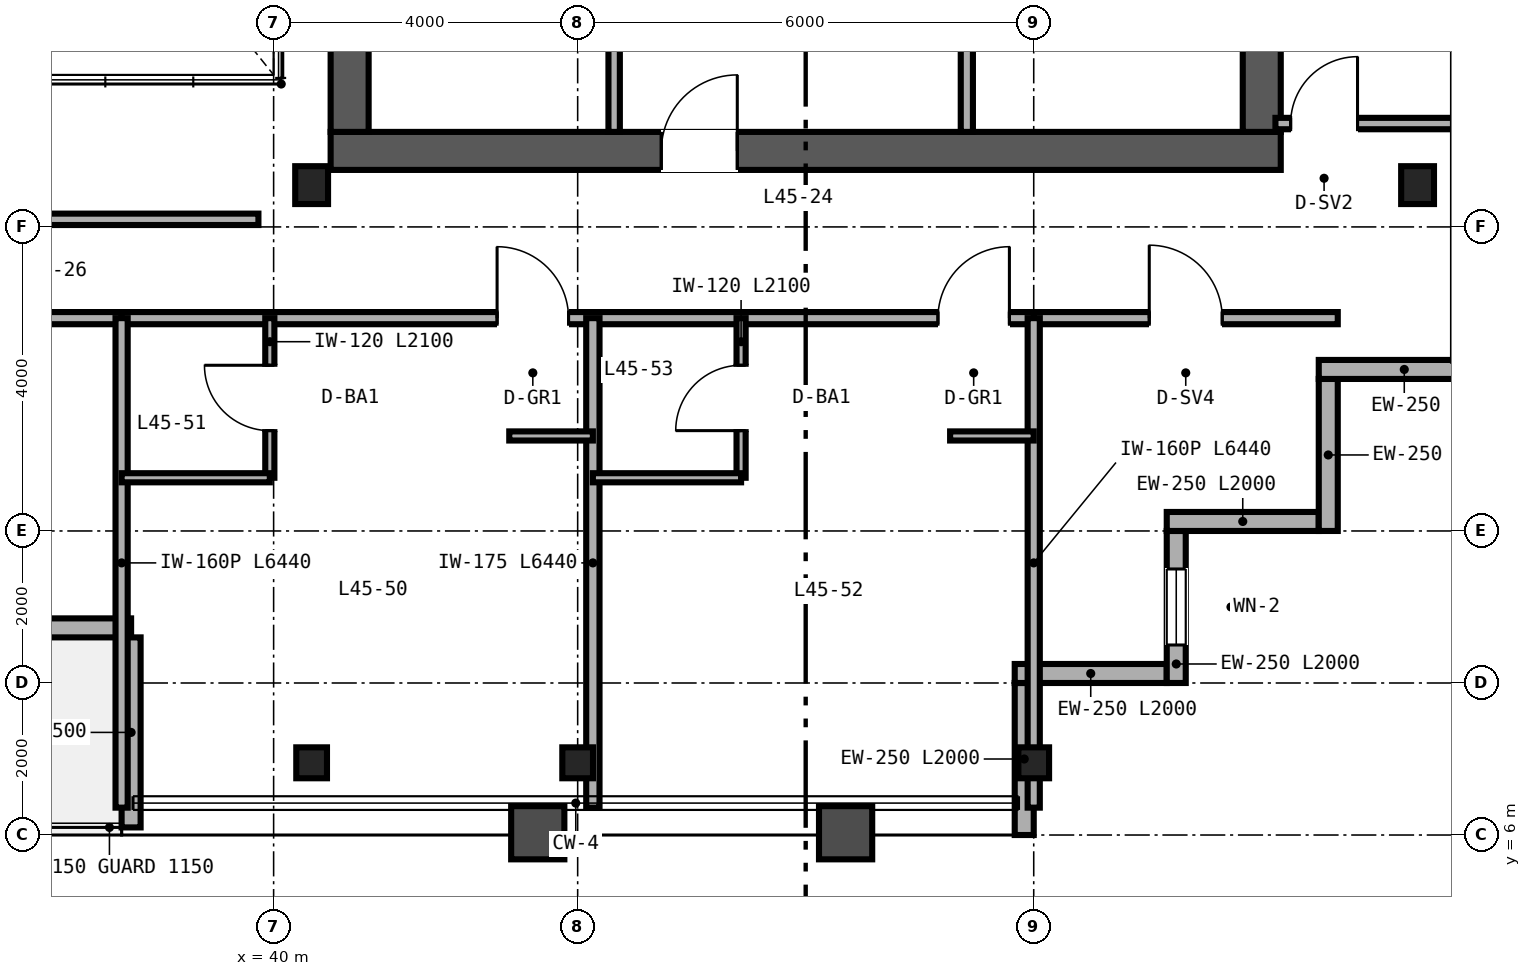
"""IFC4 building model, lengths in metres.
Left out: names, types, materials, properties, quantities, classifications, styles, units other than length and angle.
Written with IfcOpenShell. Run it as: python <this file> out.ifc"""

import sys

from ifc_helpers import new_model, si_unit, direction, frame, frame_2d, origin, origin_2d, place, context, subcontext, project, spatial, rectangle, i_section, extrude, source, transform, mapped, element, fill, save


model = new_model("IFC4")
c1 = context("Model", 3, precision=1e-05, world=origin(), true_north=direction((0.0, 1.0)))
c2 = subcontext(c1, "Body", "Model", "MODEL_VIEW")
j1 = project(units=[si_unit("LENGTHUNIT", "METRE"), si_unit("PLANEANGLEUNIT", "RADIAN")], contexts=[c1])
p1 = place(None, origin())
s1 = spatial("IfcSite", under=j1, at=p1, CompositionType="ELEMENT")
p2 = place(p1, origin())
s2 = spatial("IfcBuilding", under=s1, at=p2, CompositionType="ELEMENT")
p3 = place(p2, frame((0.0, 0.0, 181.2)))
s3 = spatial("IfcBuildingStorey", under=s2, at=p3, CompositionType="ELEMENT", Elevation=181.2)
p4 = place(p3, frame((40.75, 15.0, 0.0), z_axis=(0.0, 0.0, 1.0), x_axis=(1.0, 0.0, 0.0)))
e1 = element("IfcWall", 1, at=p4, inside=s3, PredefinedType="SHEAR", context=c2, shape_type="SweptSolid", body=[
    extrude(rectangle(XDim=12.5, YDim=0.5, at=frame_2d((6.25, 0.0))), origin(), (0.0, 0.0, 1.0), 3.37),
])
p5 = place(p4, frame((4.35, 0.0, 0.0)))
e2 = element("IfcOpeningElement", 2, at=p5, cuts=e1, PredefinedType="OPENING", context=c2, shape_type="SweptSolid", body=[
    extrude(rectangle(XDim=1.0, YDim=2.15, at=frame_2d((0.5, 1.075))), frame((0.0, 0.26, 0.0), z_axis=(0.0, -1.0, 0.0), x_axis=(1.0, 0.0, 0.0)), (0.0, 0.0, 1.0), 0.52),
])
for number, where, z_axis, x_axis in (
    (3, (41.0, 15.25, 0.0), (0.0, 0.0, 1.0), (0.0, 1.0, 0.0)),
    (4, (53.0, 15.25, 0.0), (0.0, 0.0, 1.0), (0.0, 1.0, 0.0)),
):
    element("IfcWall", number, at=place(p3, frame(where, z_axis=z_axis, x_axis=x_axis)), inside=s3, PredefinedType="SHEAR", context=c2, shape_type="SweptSolid", body=[
        extrude(rectangle(XDim=21.5, YDim=0.5, at=frame_2d((10.75, 0.0))), origin(), (0.0, 0.0, 1.0), 3.37),
    ])
m1 = source(origin(), c2, "Body", "SweptSolid", [
    extrude(i_section(OverallWidth=0.432, OverallDepth=0.498, WebThickness=0.056, FlangeThickness=0.089, FilletRadius=0.025, at=origin_2d()), origin(), (0.0, 0.0, 1.0), 3.37),
])
for number, where, z_axis, x_axis in (
    (5, (40.5, 14.55, 0.0), (0.0, 0.0, 1.0), (1.0, 0.0, 0.0)),
    (6, (55.05, 14.55, 0.0), (0.0, 0.0, 1.0), (1.0, 0.0, 0.0)),
):
    element("IfcColumn", number, at=place(p3, frame(where, z_axis=z_axis, x_axis=x_axis)), inside=s3, PredefinedType="COLUMN", context=c2, shape_type="MappedRepresentation", body=[
        mapped(m1, transform((0.0, 0.0, 0.0), scale=1.0)),
    ])
m2 = source(origin(), c2, "Body", "SweptSolid", [
    extrude(i_section(OverallWidth=0.404, OverallDepth=0.407, WebThickness=0.027, FlangeThickness=0.044, FilletRadius=0.025, at=origin_2d()), origin(), (0.0, 0.0, 1.0), 3.37),
])
for number, where, z_axis, x_axis in (
    (7, (40.5, 6.95, 0.0), (0.0, 0.0, 1.0), (1.0, 0.0, 0.0)),
    (8, (44.0, 6.95, 0.0), (0.0, 0.0, 1.0), (1.0, 0.0, 0.0)),
    (9, (50.0, 6.95, 0.0), (0.0, 0.0, 1.0), (1.0, 0.0, 0.0)),
):
    element("IfcColumn", number, at=place(p3, frame(where, z_axis=z_axis, x_axis=x_axis)), inside=s3, PredefinedType="COLUMN", context=c2, shape_type="MappedRepresentation", body=[
        mapped(m2, transform((0.0, 0.0, 0.0), scale=1.0)),
    ])
p6 = place(p3, frame((49.875, 6.0, 0.0), z_axis=(0.0, 0.0, 1.0), x_axis=(0.0, 1.0, 0.0)))
e10 = element("IfcWall", 10, at=p6, inside=s3, PredefinedType="SOLIDWALL", context=c2, shape_type="SweptSolid", body=[
    extrude(rectangle(XDim=2.0, YDim=0.25, at=frame_2d((1.0, 0.0))), origin(), (0.0, 0.0, 1.0), 2.677),
])
p7 = place(p3, frame((49.75, 8.125, 0.0), z_axis=(0.0, 0.0, 1.0), x_axis=(1.0, 0.0, 0.0)))
e11 = element("IfcWall", 11, at=p7, inside=s3, PredefinedType="SOLIDWALL", context=c2, shape_type="SweptSolid", body=[
    extrude(rectangle(XDim=2.0, YDim=0.25, at=frame_2d((1.0, 0.0))), origin(), (0.0, 0.0, 1.0), 3.37),
])
p8 = place(p3, frame((51.875, 8.0, 0.0), z_axis=(0.0, 0.0, 1.0), x_axis=(0.0, 1.0, 0.0)))
e12 = element("IfcWall", 12, at=p8, inside=s3, PredefinedType="SOLIDWALL", context=c2, shape_type="SweptSolid", body=[
    extrude(rectangle(XDim=2.0, YDim=0.25, at=frame_2d((1.0, 0.0))), origin(), (0.0, 0.0, 1.0), 3.37),
])
p9 = place(p8, frame((0.5, 0.0, 0.85)))
e13 = element("IfcOpeningElement", 13, at=p9, cuts=e12, PredefinedType="OPENING", context=c2, shape_type="SweptSolid", body=[
    extrude(rectangle(XDim=1.0, YDim=1.9, at=frame_2d((0.5, 0.95))), frame((0.0, 0.135, 0.0), z_axis=(0.0, -1.0, 0.0), x_axis=(1.0, 0.0, 0.0)), (0.0, 0.0, 1.0), 0.27),
])
for number, where, z_axis, x_axis in (
    (14, (51.75, 10.125, 0.0), (0.0, 0.0, 1.0), (1.0, 0.0, 0.0)),
    (15, (53.875, 10.0, 0.0), (0.0, 0.0, 1.0), (0.0, 1.0, 0.0)),
):
    element("IfcWall", number, at=place(p3, frame(where, z_axis=z_axis, x_axis=x_axis)), inside=s3, PredefinedType="SOLIDWALL", context=c2, shape_type="SweptSolid", body=[
        extrude(rectangle(XDim=2.0, YDim=0.25, at=frame_2d((1.0, 0.0))), origin(), (0.0, 0.0, 1.0), 3.37),
    ])
p10 = place(p3, frame((53.75, 12.125, 0.0), z_axis=(0.0, 0.0, 1.0), x_axis=(1.0, 0.0, 0.0)))
e16 = element("IfcWall", 16, at=p10, inside=s3, PredefinedType="SOLIDWALL", context=c2, shape_type="SweptSolid", body=[
    extrude(rectangle(XDim=2.25, YDim=0.25, at=frame_2d((1.125, 0.0))), origin(), (0.0, 0.0, 1.0), 3.37),
])
p11 = place(p3, frame((25.875, 8.725, 0.0), z_axis=(0.0, 0.0, 1.0), x_axis=(1.0, 0.0, 0.0)))
e17 = element("IfcWall", 17, at=p11, inside=s3, PredefinedType="SOLIDWALL", context=c2, shape_type="SweptSolid", body=[
    extrude(rectangle(XDim=12.25, YDim=0.25, at=frame_2d((6.125, 0.0))), origin(), (0.0, 0.0, 1.0), 3.37),
])
p12 = place(p11, frame((5.6, 0.0, 0.0)))
e18 = element("IfcOpeningElement", 18, at=p12, cuts=e17, PredefinedType="OPENING", context=c2, shape_type="SweptSolid", body=[
    extrude(rectangle(XDim=1.05, YDim=2.15, at=frame_2d((0.525, 1.075))), frame((0.0, 0.135, 0.0), z_axis=(0.0, -1.0, 0.0), x_axis=(1.0, 0.0, 0.0)), (0.0, 0.0, 1.0), 0.27),
])
p13 = place(p3, frame((38.125, 6.1, 0.0), z_axis=(0.0, 0.0, 1.0), x_axis=(0.0, 1.0, 0.0)))
e19 = element("IfcWall", 19, at=p13, inside=s3, PredefinedType="SOLIDWALL", context=c2, shape_type="SweptSolid", body=[
    extrude(rectangle(XDim=2.5, YDim=0.25, at=frame_2d((1.25, 0.0))), origin(), (0.0, 0.0, 1.0), 2.443),
])
p14 = place(p3, frame((49.12, 15.25, 0.0), z_axis=(0.0, 0.0, 1.0), x_axis=(0.0, 1.0, 0.0)))
e20 = element("IfcWall", 20, at=p14, inside=s3, PredefinedType="PARTITIONING", context=c2, shape_type="SweptSolid", body=[
    extrude(rectangle(XDim=16.13, YDim=0.16, at=frame_2d((8.065, 0.0))), origin(), (0.0, 0.0, 1.0), 2.443),
])
p15 = place(p14, frame((4.0, 0.0, 0.0)))
e21 = element("IfcOpeningElement", 21, at=p15, cuts=e20, PredefinedType="OPENING", context=c2, shape_type="SweptSolid", body=[
    extrude(rectangle(XDim=0.92, YDim=2.15, at=frame_2d((0.46, 1.075))), frame((0.0, 0.09, 0.0), z_axis=(0.0, -1.0, 0.0), x_axis=(1.0, 0.0, 0.0)), (0.0, 0.0, 1.0), 0.18),
])
p16 = place(p14, frame((12.0, 0.0, 0.0)))
e22 = element("IfcOpeningElement", 22, at=p16, cuts=e20, PredefinedType="OPENING", context=c2, shape_type="SweptSolid", body=[
    extrude(rectangle(XDim=0.92, YDim=2.15, at=frame_2d((0.46, 1.075))), frame((0.0, 0.09, 0.0), z_axis=(0.0, -1.0, 0.0), x_axis=(1.0, 0.0, 0.0)), (0.0, 0.0, 1.0), 0.18),
])
p17 = place(p3, frame((44.48, 15.25, 0.0), z_axis=(0.0, 0.0, 1.0), x_axis=(0.0, 1.0, 0.0)))
e23 = element("IfcWall", 23, at=p17, inside=s3, PredefinedType="PARTITIONING", context=c2, shape_type="SweptSolid", body=[
    extrude(rectangle(XDim=11.63, YDim=0.15, at=frame_2d((5.815, 0.0))), origin(), (0.0, 0.0, 1.0), 3.37),
])
p18 = place(p17, frame((4.5, 0.0, 0.0)))
e24 = element("IfcOpeningElement", 24, at=p18, cuts=e23, PredefinedType="OPENING", context=c2, shape_type="SweptSolid", body=[
    extrude(rectangle(XDim=0.92, YDim=2.15, at=frame_2d((0.46, 1.075))), frame((0.0, 0.085, 0.0), z_axis=(0.0, -1.0, 0.0), x_axis=(1.0, 0.0, 0.0)), (0.0, 0.0, 1.0), 0.17),
])
p19 = place(p3, frame((24.2, 14.1, 0.0), z_axis=(0.0, 0.0, 1.0), x_axis=(1.0, 0.0, 0.0)))
e25 = element("IfcWall", 25, at=p19, inside=s3, PredefinedType="PARTITIONING", context=c2, shape_type="SweptSolid", body=[
    extrude(rectangle(XDim=15.6, YDim=0.15, at=frame_2d((7.8, 0.0))), origin(), (0.0, 0.0, 1.0), 3.37),
])
p20 = place(p19, frame((3.0, 0.0, 0.0)))
e26 = element("IfcOpeningElement", 26, at=p20, cuts=e25, PredefinedType="OPENING", context=c2, shape_type="SweptSolid", body=[
    extrude(rectangle(XDim=0.9, YDim=2.15, at=frame_2d((0.45, 1.075))), frame((0.0, 0.085, 0.0), z_axis=(0.0, -1.0, 0.0), x_axis=(1.0, 0.0, 0.0)), (0.0, 0.0, 1.0), 0.17),
])
p21 = place(p19, frame((11.0, 0.0, 0.0)))
e27 = element("IfcOpeningElement", 27, at=p21, cuts=e25, PredefinedType="OPENING", context=c2, shape_type="SweptSolid", body=[
    extrude(rectangle(XDim=0.9, YDim=2.15, at=frame_2d((0.45, 1.075))), frame((0.0, 0.085, 0.0), z_axis=(0.0, -1.0, 0.0), x_axis=(1.0, 0.0, 0.0)), (0.0, 0.0, 1.0), 0.17),
])
p22 = place(p3, frame((53.18, 15.36, 0.0), z_axis=(0.0, 0.0, 1.0), x_axis=(1.0, 0.0, 0.0)))
e28 = element("IfcWall", 28, at=p22, inside=s3, PredefinedType="PARTITIONING", context=c2, shape_type="SweptSolid", body=[
    extrude(rectangle(XDim=2.66, YDim=0.15, at=frame_2d((1.33, 0.0))), origin(), (0.0, 0.0, 1.0), 2.591),
])
p23 = place(p22, frame((0.2, 0.0, 0.0)))
e29 = element("IfcOpeningElement", 29, at=p23, cuts=e28, PredefinedType="OPENING", context=c2, shape_type="SweptSolid", body=[
    extrude(rectangle(XDim=0.88, YDim=2.15, at=frame_2d((0.44, 1.075))), frame((0.0, 0.085, 0.0), z_axis=(0.0, -1.0, 0.0), x_axis=(1.0, 0.0, 0.0)), (0.0, 0.0, 1.0), 0.17),
])
p24 = place(p3, frame((50.0, 12.8, 0.0), z_axis=(0.0, 0.0, 1.0), x_axis=(1.0, 0.0, 0.0)))
e30 = element("IfcWall", 30, at=p24, inside=s3, PredefinedType="PARTITIONING", context=c2, shape_type="SweptSolid", body=[
    extrude(rectangle(XDim=4.0, YDim=0.16, at=frame_2d((2.0, 0.0))), origin(), (0.0, 0.0, 1.0), 3.37),
])
p25 = place(p24, frame((1.52, 0.0, 0.0)))
e31 = element("IfcOpeningElement", 31, at=p25, cuts=e30, PredefinedType="OPENING", context=c2, shape_type="SweptSolid", body=[
    extrude(rectangle(XDim=0.96, YDim=2.15, at=frame_2d((0.48, 1.075))), frame((0.0, 0.09, 0.0), z_axis=(0.0, -1.0, 0.0), x_axis=(1.0, 0.0, 0.0)), (0.0, 0.0, 1.0), 0.18),
])
p26 = place(p3, frame((26.0, 12.8, 0.0), z_axis=(0.0, 0.0, 1.0), x_axis=(1.0, 0.0, 0.0)))
e32 = element("IfcWall", 32, at=p26, inside=s3, PredefinedType="PARTITIONING", context=c2, shape_type="SweptSolid", body=[
    extrude(rectangle(XDim=12.0, YDim=0.16, at=frame_2d((6.0, 0.0))), origin(), (0.0, 0.0, 1.0), 3.37),
])
p27 = place(p26, frame((5.2, 0.0, 0.0)))
e33 = element("IfcOpeningElement", 33, at=p27, cuts=e32, PredefinedType="OPENING", context=c2, shape_type="SweptSolid", body=[
    extrude(rectangle(XDim=0.96, YDim=2.15, at=frame_2d((0.48, 1.075))), frame((0.0, 0.09, 0.0), z_axis=(0.0, -1.0, 0.0), x_axis=(1.0, 0.0, 0.0)), (0.0, 0.0, 1.0), 0.18),
])
p28 = place(p3, frame((38.0, 12.8, 0.0), z_axis=(0.0, 0.0, 1.0), x_axis=(1.0, 0.0, 0.0)))
e34 = element("IfcWall", 34, at=p28, inside=s3, PredefinedType="PARTITIONING", context=c2, shape_type="SweptSolid", body=[
    extrude(rectangle(XDim=12.0, YDim=0.16, at=frame_2d((6.0, 0.0))), origin(), (0.0, 0.0, 1.0), 2.913),
])
p29 = place(p28, frame((4.94, 0.0, 0.0)))
e35 = element("IfcOpeningElement", 35, at=p29, cuts=e34, PredefinedType="OPENING", context=c2, shape_type="SweptSolid", body=[
    extrude(rectangle(XDim=0.94, YDim=2.15, at=frame_2d((0.47, 1.075))), frame((0.0, 0.09, 0.0), z_axis=(0.0, -1.0, 0.0), x_axis=(1.0, 0.0, 0.0)), (0.0, 0.0, 1.0), 0.18),
])
p30 = place(p28, frame((10.74, 0.0, 0.0)))
e36 = element("IfcOpeningElement", 36, at=p30, cuts=e34, PredefinedType="OPENING", context=c2, shape_type="SweptSolid", body=[
    extrude(rectangle(XDim=0.94, YDim=2.15, at=frame_2d((0.47, 1.075))), frame((0.0, 0.09, 0.0), z_axis=(0.0, -1.0, 0.0), x_axis=(1.0, 0.0, 0.0)), (0.0, 0.0, 1.0), 0.18),
])
p31 = place(p3, frame((38.0, 6.36, 0.0), z_axis=(0.0, 0.0, 1.0), x_axis=(0.0, 1.0, 0.0)))
e37 = element("IfcWall", 37, at=p31, inside=s3, PredefinedType="PARTITIONING", context=c2, shape_type="SweptSolid", body=[
    extrude(rectangle(XDim=6.44, YDim=0.16, at=frame_2d((3.22, 0.0))), origin(), (0.0, 0.0, 1.0), 2.443),
])
p32 = place(p3, frame((50.0, 6.36, 0.0), z_axis=(0.0, 0.0, 1.0), x_axis=(0.0, 1.0, 0.0)))
e38 = element("IfcWall", 38, at=p32, inside=s3, PredefinedType="PARTITIONING", context=c2, shape_type="SweptSolid", body=[
    extrude(rectangle(XDim=6.44, YDim=0.16, at=frame_2d((3.22, 0.0))), origin(), (0.0, 0.0, 1.0), 2.677),
])
p33 = place(p3, frame((44.2, 6.36, 0.0), z_axis=(0.0, 0.0, 1.0), x_axis=(0.0, 1.0, 0.0)))
e39 = element("IfcWall", 39, at=p33, inside=s3, PredefinedType="PARTITIONING", context=c2, shape_type="SweptSolid", body=[
    extrude(rectangle(XDim=6.44, YDim=0.175, at=frame_2d((3.22, 0.0))), origin(), (0.0, 0.0, 1.0), 2.677),
])
p34 = place(p3, frame((39.95, 10.7, 0.0), z_axis=(0.0, 0.0, 1.0), x_axis=(0.0, 1.0, 0.0)))
e40 = element("IfcWall", 40, at=p34, inside=s3, PredefinedType="PARTITIONING", context=c2, shape_type="SweptSolid", body=[
    extrude(rectangle(XDim=2.1, YDim=0.12, at=frame_2d((1.05, 0.0))), origin(), (0.0, 0.0, 1.0), 3.37),
])
p35 = place(p34, frame((0.62, 0.0, 0.0)))
e41 = element("IfcOpeningElement", 41, at=p35, cuts=e40, PredefinedType="OPENING", context=c2, shape_type="SweptSolid", body=[
    extrude(rectangle(XDim=0.86, YDim=2.1, at=frame_2d((0.43, 1.05))), frame((0.0, 0.07, 0.0), z_axis=(0.0, -1.0, 0.0), x_axis=(1.0, 0.0, 0.0)), (0.0, 0.0, 1.0), 0.14),
])
p36 = place(p3, frame((38.0, 10.7, 0.0), z_axis=(0.0, 0.0, 1.0), x_axis=(1.0, 0.0, 0.0)))
e42 = element("IfcWall", 42, at=p36, inside=s3, PredefinedType="PARTITIONING", context=c2, shape_type="SweptSolid", body=[
    extrude(rectangle(XDim=1.95, YDim=0.12, at=frame_2d((0.975, 0.0))), origin(), (0.0, 0.0, 1.0), 3.37),
])
p37 = place(p3, frame((43.1, 11.25, 0.0), z_axis=(0.0, 0.0, 1.0), x_axis=(1.0, 0.0, 0.0)))
e43 = element("IfcWall", 43, at=p37, inside=s3, PredefinedType="PARTITIONING", context=c2, shape_type="SweptSolid", body=[
    extrude(rectangle(XDim=1.1, YDim=0.12, at=frame_2d((0.55, 0.0))), origin(), (0.0, 0.0, 1.0), 3.37),
])
p38 = place(p3, frame((46.15, 10.7, 0.0), z_axis=(0.0, 0.0, 1.0), x_axis=(0.0, 1.0, 0.0)))
e44 = element("IfcWall", 44, at=p38, inside=s3, PredefinedType="PARTITIONING", context=c2, shape_type="SweptSolid", body=[
    extrude(rectangle(XDim=2.1, YDim=0.12, at=frame_2d((1.05, 0.0))), origin(), (0.0, 0.0, 1.0), 3.37),
])
p39 = place(p38, frame((0.62, 0.0, 0.0)))
e45 = element("IfcOpeningElement", 45, at=p39, cuts=e44, PredefinedType="OPENING", context=c2, shape_type="SweptSolid", body=[
    extrude(rectangle(XDim=0.86, YDim=2.1, at=frame_2d((0.43, 1.05))), frame((0.0, 0.07, 0.0), z_axis=(0.0, -1.0, 0.0), x_axis=(1.0, 0.0, 0.0)), (0.0, 0.0, 1.0), 0.14),
])
p40 = place(p3, frame((44.2, 10.7, 0.0), z_axis=(0.0, 0.0, 1.0), x_axis=(1.0, 0.0, 0.0)))
e46 = element("IfcWall", 46, at=p40, inside=s3, PredefinedType="PARTITIONING", context=c2, shape_type="SweptSolid", body=[
    extrude(rectangle(XDim=1.95, YDim=0.12, at=frame_2d((0.975, 0.0))), origin(), (0.0, 0.0, 1.0), 3.37),
])
p41 = place(p3, frame((48.9, 11.25, 0.0), z_axis=(0.0, 0.0, 1.0), x_axis=(1.0, 0.0, 0.0)))
e47 = element("IfcWall", 47, at=p41, inside=s3, PredefinedType="PARTITIONING", context=c2, shape_type="SweptSolid", body=[
    extrude(rectangle(XDim=1.1, YDim=0.12, at=frame_2d((0.55, 0.0))), origin(), (0.0, 0.0, 1.0), 3.37),
])
m3 = source(origin(), c2, "Body", "SweptSolid", [
    extrude(rectangle(XDim=1.0, YDim=1.9, at=frame_2d((0.5, 0.95))), frame((0.0, 0.03, 0.0), z_axis=(0.0, -1.0, 0.0), x_axis=(1.0, 0.0, 0.0)), (0.0, 0.0, 1.0), 0.06),
])
p42 = place(p9, origin())
e48 = element("IfcWindow", 48, at=p42, inside=s3, PartitioningType="SINGLE_PANEL", PredefinedType="WINDOW", context=c2, shape_type="MappedRepresentation", body=[
    mapped(m3, transform((0.0, 0.0, 0.0), scale=1.0)),
])
fill(e13, e48)
m4 = source(origin(), c2, "Body", "SweptSolid", [
    extrude(rectangle(XDim=1.0, YDim=2.15, at=frame_2d((0.5, 1.075))), frame((0.0, 0.025, 0.0), z_axis=(0.0, -1.0, 0.0), x_axis=(1.0, 0.0, 0.0)), (0.0, 0.0, 1.0), 0.05),
])
p43 = place(p5, origin())
e49 = element("IfcDoor", 49, at=p43, inside=s3, OperationType="SINGLE_SWING_RIGHT", PredefinedType="DOOR", context=c2, shape_type="MappedRepresentation", body=[
    mapped(m4, transform((0.0, 0.0, 0.0), scale=1.0)),
])
fill(e2, e49)
m5 = source(origin(), c2, "Body", "SweptSolid", [
    extrude(rectangle(XDim=0.88, YDim=2.15, at=frame_2d((0.44, 1.075))), frame((0.0, 0.025, 0.0), z_axis=(0.0, -1.0, 0.0), x_axis=(1.0, 0.0, 0.0)), (0.0, 0.0, 1.0), 0.05),
])
p44 = place(p23, origin())
e50 = element("IfcDoor", 50, at=p44, inside=s3, OperationType="SINGLE_SWING_RIGHT", PredefinedType="DOOR", context=c2, shape_type="MappedRepresentation", body=[
    mapped(m5, transform((0.0, 0.0, 0.0), scale=1.0)),
])
fill(e29, e50)
m6 = source(origin(), c2, "Body", "SweptSolid", [
    extrude(rectangle(XDim=0.96, YDim=2.15, at=frame_2d((0.48, 1.075))), frame((0.0, 0.025, 0.0), z_axis=(0.0, -1.0, 0.0), x_axis=(1.0, 0.0, 0.0)), (0.0, 0.0, 1.0), 0.05),
])
p45 = place(p25, origin())
e51 = element("IfcDoor", 51, at=p45, inside=s3, OperationType="SINGLE_SWING_LEFT", PredefinedType="DOOR", context=c2, shape_type="MappedRepresentation", body=[
    mapped(m6, transform((0.0, 0.0, 0.0), scale=1.0)),
])
fill(e31, e51)
m7 = source(origin(), c2, "Body", "SweptSolid", [
    extrude(rectangle(XDim=0.86, YDim=2.1, at=frame_2d((0.43, 1.05))), frame((0.0, 0.025, 0.0), z_axis=(0.0, -1.0, 0.0), x_axis=(1.0, 0.0, 0.0)), (0.0, 0.0, 1.0), 0.05),
])
p46 = place(p35, origin())
e52 = element("IfcDoor", 52, at=p46, inside=s3, OperationType="SINGLE_SWING_RIGHT", PredefinedType="DOOR", context=c2, shape_type="MappedRepresentation", body=[
    mapped(m7, transform((0.0, 0.0, 0.0), scale=1.0)),
])
fill(e41, e52)
p47 = place(p39, origin())
e53 = element("IfcDoor", 53, at=p47, inside=s3, OperationType="SINGLE_SWING_LEFT", PredefinedType="DOOR", context=c2, shape_type="MappedRepresentation", body=[
    mapped(m7, transform((0.0, 0.0, 0.0), scale=1.0)),
])
fill(e45, e53)
m8 = source(origin(), c2, "Body", "SweptSolid", [
    extrude(rectangle(XDim=0.94, YDim=2.15, at=frame_2d((0.47, 1.075))), frame((0.0, 0.025, 0.0), z_axis=(0.0, -1.0, 0.0), x_axis=(1.0, 0.0, 0.0)), (0.0, 0.0, 1.0), 0.05),
])
p48 = place(p29, origin())
e54 = element("IfcDoor", 54, at=p48, inside=s3, OperationType="SINGLE_SWING_LEFT", PredefinedType="DOOR", context=c2, shape_type="MappedRepresentation", body=[
    mapped(m8, transform((0.0, 0.0, 0.0), scale=1.0)),
])
fill(e35, e54)
p49 = place(p30, origin())
e55 = element("IfcDoor", 55, at=p49, inside=s3, OperationType="SINGLE_SWING_RIGHT", PredefinedType="DOOR", context=c2, shape_type="MappedRepresentation", body=[
    mapped(m8, transform((0.0, 0.0, 0.0), scale=1.0)),
])
fill(e36, e55)
save(model, sys.argv[1])
